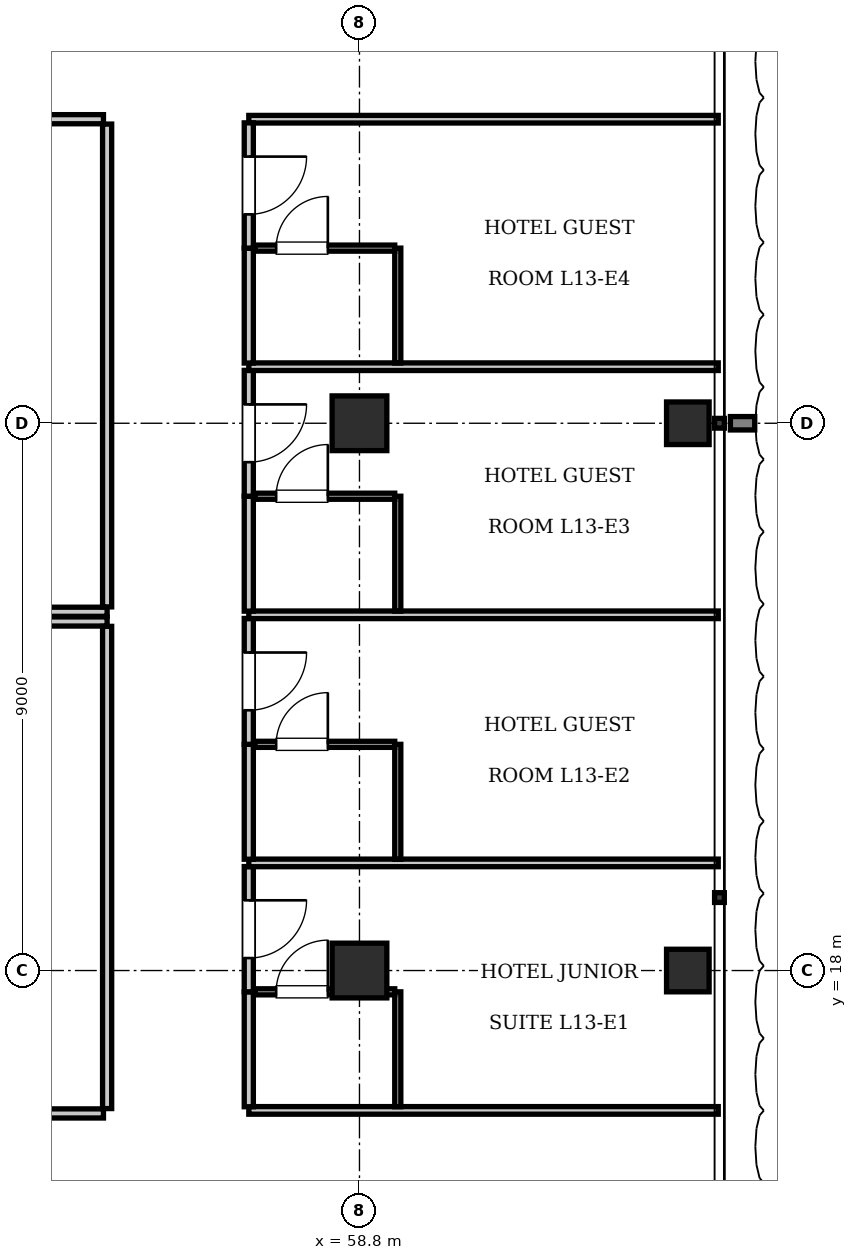
"""IFC4 building model, lengths in metres.
Left out: names, types, materials, properties, quantities, classifications, styles, units other than length and angle.
Written with IfcOpenShell. Run it as: python <this file> out.ifc"""

import sys

from ifc_helpers import new_model, si_unit, direction, frame, frame_2d, origin, origin_2d, place, context, subcontext, project, spatial, rectangle, i_section, extrude, element, fill, save


model = new_model("IFC4")
c1 = context("Model", 3, precision=1e-05, world=origin(), true_north=direction((0.0, 1.0)))
c2 = subcontext(c1, "Body", "Model", "MODEL_VIEW")
j1 = project(units=[si_unit("LENGTHUNIT", "METRE"), si_unit("PLANEANGLEUNIT", "RADIAN")], contexts=[c1])
p1 = place(None, origin())
s1 = spatial("IfcSite", under=j1, at=p1, CompositionType="ELEMENT")
p2 = place(p1, origin())
s2 = spatial("IfcBuilding", under=s1, at=p2, CompositionType="ELEMENT")
p3 = place(p2, frame((0.0, 0.0, 57.75)))
s3 = spatial("IfcBuildingStorey", under=s2, at=p3, CompositionType="ELEMENT", Elevation=57.75)
for number, where, z_axis, x_axis in (
    (1, (58.8, 18.0, 0.0), (0.0, 0.0, 1.0), (1.0, 0.0, 0.0)),
    (2, (58.8, 27.0, 0.0), (0.0, 0.0, 1.0), (1.0, 0.0, 0.0)),
):
    element("IfcColumn", number, at=place(p3, frame(where, z_axis=z_axis, x_axis=x_axis)), inside=s3, PredefinedType="COLUMN", context=c2, shape_type="SweptSolid", body=[
        extrude(rectangle(XDim=0.9, YDim=0.9, at=origin_2d()), origin(), (0.0, 0.0, 1.0), 3.85),
    ])
for number, where, z_axis, x_axis in (
    (3, (64.2, 18.0, 0.0), (0.0, 0.0, 1.0), (1.0, 0.0, 0.0)),
    (4, (64.2, 27.0, 0.0), (0.0, 0.0, 1.0), (1.0, 0.0, 0.0)),
):
    element("IfcColumn", number, at=place(p3, frame(where, z_axis=z_axis, x_axis=x_axis)), inside=s3, PredefinedType="COLUMN", context=c2, shape_type="SweptSolid", body=[
        extrude(i_section(OverallWidth=0.7, OverallDepth=0.7, WebThickness=0.028, FlangeThickness=0.044, at=origin_2d()), origin(), (0.0, 0.0, 1.0), 3.85),
    ])
p4 = place(p3, frame((20.95, 23.9, 0.0), z_axis=(0.0, 0.0, 1.0), x_axis=(1.0, 0.0, 0.0)))
e5 = element("IfcWall", 5, at=p4, inside=s3, PredefinedType="PARTITIONING", context=c2, shape_type="SweptSolid", body=[
    extrude(rectangle(XDim=33.7, YDim=0.15, at=frame_2d((16.85, 0.0))), origin(), (0.0, 0.0, 1.0), 3.61),
])
p5 = place(p3, frame((54.65, 23.98, 0.0), z_axis=(0.0, 0.0, 1.0), x_axis=(0.0, 1.0, 0.0)))
e6 = element("IfcWall", 6, at=p5, inside=s3, PredefinedType="PARTITIONING", context=c2, shape_type="SweptSolid", body=[
    extrude(rectangle(XDim=7.94, YDim=0.15, at=frame_2d((3.97, 0.0))), origin(), (0.0, 0.0, 1.0), 3.255),
])
p6 = place(p3, frame((43.222, 32.0, 0.0), z_axis=(0.0, 0.0, 1.0), x_axis=(1.0, 0.0, 0.0)))
e7 = element("IfcWall", 7, at=p6, inside=s3, PredefinedType="PARTITIONING", context=c2, shape_type="SweptSolid", body=[
    extrude(rectangle(XDim=11.368, YDim=0.15, at=frame_2d((5.684, 0.0))), origin(), (0.0, 0.0, 1.0), 3.61),
])
p7 = place(p6, frame((5.234, 0.0, 0.0)))
e8 = element("IfcOpeningElement", 8, at=p7, cuts=e7, PredefinedType="OPENING", context=c2, shape_type="SweptSolid", body=[
    extrude(rectangle(XDim=0.9, YDim=2.1, at=frame_2d((0.45, 1.05))), frame((0.0, 0.085, 0.0), z_axis=(0.0, -1.0, 0.0), x_axis=(1.0, 0.0, 0.0)), (0.0, 0.0, 1.0), 0.17),
])
p8 = place(p3, frame((20.95, 23.74, 0.0), z_axis=(0.0, 0.0, 1.0), x_axis=(1.0, 0.0, 0.0)))
e9 = element("IfcWall", 9, at=p8, inside=s3, PredefinedType="PARTITIONING", context=c2, shape_type="SweptSolid", body=[
    extrude(rectangle(XDim=33.7, YDim=0.15, at=frame_2d((16.85, 0.0))), origin(), (0.0, 0.0, 1.0), 3.61),
])
p9 = place(p3, frame((54.65, 15.73, 0.0), z_axis=(0.0, 0.0, 1.0), x_axis=(0.0, 1.0, 0.0)))
e10 = element("IfcWall", 10, at=p9, inside=s3, PredefinedType="PARTITIONING", context=c2, shape_type="SweptSolid", body=[
    extrude(rectangle(XDim=7.93, YDim=0.15, at=frame_2d((3.965, 0.0))), origin(), (0.0, 0.0, 1.0), 3.255),
])
p10 = place(p3, frame((40.189, 15.65, 0.0), z_axis=(0.0, 0.0, 1.0), x_axis=(1.0, 0.0, 0.0)))
e11 = element("IfcWall", 11, at=p10, inside=s3, PredefinedType="PARTITIONING", context=c2, shape_type="SweptSolid", body=[
    extrude(rectangle(XDim=14.401, YDim=0.15, at=frame_2d((7.201, 0.0))), origin(), (0.0, 0.0, 1.0), 3.61),
])
p11 = place(p10, frame((6.75, 0.0, 0.0)))
e12 = element("IfcOpeningElement", 12, at=p11, cuts=e11, PredefinedType="OPENING", context=c2, shape_type="SweptSolid", body=[
    extrude(rectangle(XDim=0.9, YDim=2.1, at=frame_2d((0.45, 1.05))), frame((0.0, 0.085, 0.0), z_axis=(0.0, -1.0, 0.0), x_axis=(1.0, 0.0, 0.0)), (0.0, 0.0, 1.0), 0.17),
])
for number, where, z_axis, x_axis in (
    (13, (56.98, 15.7, 0.0), (0.0, 0.0, 1.0), (1.0, 0.0, 0.0)),
    (14, (56.98, 32.0, 0.0), (0.0, 0.0, 1.0), (1.0, 0.0, 0.0)),
):
    element("IfcWall", number, at=place(p3, frame(where, z_axis=z_axis, x_axis=x_axis)), inside=s3, PredefinedType="PARTITIONING", context=c2, shape_type="SweptSolid", body=[
        extrude(rectangle(XDim=7.72, YDim=0.125, at=frame_2d((3.86, 0.0))), origin(), (0.0, 0.0, 1.0), 3.61),
    ])
p12 = place(p3, frame((56.98, 15.76, 0.0), z_axis=(0.0, 0.0, 1.0), x_axis=(0.0, 1.0, 0.0)))
e15 = element("IfcWall", 15, at=p12, inside=s3, PredefinedType="PARTITIONING", context=c2, shape_type="SweptSolid", body=[
    extrude(rectangle(XDim=1.89, YDim=0.15, at=frame_2d((0.945, 0.0))), origin(), (0.0, 0.0, 1.0), 3.61),
])
p13 = place(p3, frame((56.98, 17.65, 0.0), z_axis=(0.0, 0.0, 1.0), x_axis=(0.0, 1.0, 0.0)))
e16 = element("IfcWall", 16, at=p13, inside=s3, PredefinedType="PARTITIONING", context=c2, shape_type="SweptSolid", body=[
    extrude(rectangle(XDim=2.06, YDim=0.15, at=frame_2d((1.03, 0.0))), origin(), (0.0, 0.0, 1.0), 3.61),
])
p14 = place(p13, frame((0.555, 0.0, 0.0)))
e17 = element("IfcOpeningElement", 17, at=p14, cuts=e16, PredefinedType="OPENING", context=c2, shape_type="SweptSolid", body=[
    extrude(rectangle(XDim=0.95, YDim=2.15, at=frame_2d((0.475, 1.075))), frame((0.0, 0.085, 0.0), z_axis=(0.0, -1.0, 0.0), x_axis=(1.0, 0.0, 0.0)), (0.0, 0.0, 1.0), 0.17),
])
p15 = place(p3, frame((59.43, 15.76, 0.0), z_axis=(0.0, 0.0, 1.0), x_axis=(0.0, 1.0, 0.0)))
e18 = element("IfcWall", 18, at=p15, inside=s3, PredefinedType="PARTITIONING", context=c2, shape_type="SweptSolid", body=[
    extrude(rectangle(XDim=1.89, YDim=0.1, at=frame_2d((0.945, 0.0))), origin(), (0.0, 0.0, 1.0), 3.61),
])
p16 = place(p3, frame((57.08, 17.65, 0.0), z_axis=(0.0, 0.0, 1.0), x_axis=(1.0, 0.0, 0.0)))
e19 = element("IfcWall", 19, at=p16, inside=s3, PredefinedType="PARTITIONING", context=c2, shape_type="SweptSolid", body=[
    extrude(rectangle(XDim=2.3, YDim=0.1, at=frame_2d((1.15, 0.0))), origin(), (0.0, 0.0, 1.0), 3.61),
])
p17 = place(p16, frame((0.35, 0.0, 0.0)))
e20 = element("IfcOpeningElement", 20, at=p17, cuts=e19, PredefinedType="OPENING", context=c2, shape_type="SweptSolid", body=[
    extrude(rectangle(XDim=0.85, YDim=2.1, at=frame_2d((0.425, 1.05))), frame((0.0, 0.06, 0.0), z_axis=(0.0, -1.0, 0.0), x_axis=(1.0, 0.0, 0.0)), (0.0, 0.0, 1.0), 0.12),
])
p18 = place(p3, frame((56.98, 19.77, 0.0), z_axis=(0.0, 0.0, 1.0), x_axis=(1.0, 0.0, 0.0)))
e21 = element("IfcWall", 21, at=p18, inside=s3, PredefinedType="PARTITIONING", context=c2, shape_type="SweptSolid", body=[
    extrude(rectangle(XDim=7.72, YDim=0.125, at=frame_2d((3.86, 0.0))), origin(), (0.0, 0.0, 1.0), 3.61),
])
p19 = place(p3, frame((56.98, 19.83, 0.0), z_axis=(0.0, 0.0, 1.0), x_axis=(0.0, 1.0, 0.0)))
e22 = element("IfcWall", 22, at=p19, inside=s3, PredefinedType="PARTITIONING", context=c2, shape_type="SweptSolid", body=[
    extrude(rectangle(XDim=1.89, YDim=0.15, at=frame_2d((0.945, 0.0))), origin(), (0.0, 0.0, 1.0), 3.61),
])
p20 = place(p3, frame((56.98, 21.72, 0.0), z_axis=(0.0, 0.0, 1.0), x_axis=(0.0, 1.0, 0.0)))
e23 = element("IfcWall", 23, at=p20, inside=s3, PredefinedType="PARTITIONING", context=c2, shape_type="SweptSolid", body=[
    extrude(rectangle(XDim=2.07, YDim=0.15, at=frame_2d((1.035, 0.0))), origin(), (0.0, 0.0, 1.0), 3.61),
])
p21 = place(p20, frame((0.56, 0.0, 0.0)))
e24 = element("IfcOpeningElement", 24, at=p21, cuts=e23, PredefinedType="OPENING", context=c2, shape_type="SweptSolid", body=[
    extrude(rectangle(XDim=0.95, YDim=2.15, at=frame_2d((0.475, 1.075))), frame((0.0, 0.085, 0.0), z_axis=(0.0, -1.0, 0.0), x_axis=(1.0, 0.0, 0.0)), (0.0, 0.0, 1.0), 0.17),
])
p22 = place(p3, frame((59.43, 19.83, 0.0), z_axis=(0.0, 0.0, 1.0), x_axis=(0.0, 1.0, 0.0)))
e25 = element("IfcWall", 25, at=p22, inside=s3, PredefinedType="PARTITIONING", context=c2, shape_type="SweptSolid", body=[
    extrude(rectangle(XDim=1.89, YDim=0.1, at=frame_2d((0.945, 0.0))), origin(), (0.0, 0.0, 1.0), 3.61),
])
p23 = place(p3, frame((57.08, 21.72, 0.0), z_axis=(0.0, 0.0, 1.0), x_axis=(1.0, 0.0, 0.0)))
e26 = element("IfcWall", 26, at=p23, inside=s3, PredefinedType="PARTITIONING", context=c2, shape_type="SweptSolid", body=[
    extrude(rectangle(XDim=2.3, YDim=0.1, at=frame_2d((1.15, 0.0))), origin(), (0.0, 0.0, 1.0), 3.61),
])
p24 = place(p23, frame((0.35, 0.0, 0.0)))
e27 = element("IfcOpeningElement", 27, at=p24, cuts=e26, PredefinedType="OPENING", context=c2, shape_type="SweptSolid", body=[
    extrude(rectangle(XDim=0.85, YDim=2.1, at=frame_2d((0.425, 1.05))), frame((0.0, 0.06, 0.0), z_axis=(0.0, -1.0, 0.0), x_axis=(1.0, 0.0, 0.0)), (0.0, 0.0, 1.0), 0.12),
])
p25 = place(p3, frame((56.98, 23.85, 0.0), z_axis=(0.0, 0.0, 1.0), x_axis=(1.0, 0.0, 0.0)))
e28 = element("IfcWall", 28, at=p25, inside=s3, PredefinedType="PARTITIONING", context=c2, shape_type="SweptSolid", body=[
    extrude(rectangle(XDim=7.72, YDim=0.125, at=frame_2d((3.86, 0.0))), origin(), (0.0, 0.0, 1.0), 3.61),
])
p26 = place(p3, frame((56.98, 23.91, 0.0), z_axis=(0.0, 0.0, 1.0), x_axis=(0.0, 1.0, 0.0)))
e29 = element("IfcWall", 29, at=p26, inside=s3, PredefinedType="PARTITIONING", context=c2, shape_type="SweptSolid", body=[
    extrude(rectangle(XDim=1.89, YDim=0.15, at=frame_2d((0.945, 0.0))), origin(), (0.0, 0.0, 1.0), 3.61),
])
p27 = place(p3, frame((56.98, 25.8, 0.0), z_axis=(0.0, 0.0, 1.0), x_axis=(0.0, 1.0, 0.0)))
e30 = element("IfcWall", 30, at=p27, inside=s3, PredefinedType="PARTITIONING", context=c2, shape_type="SweptSolid", body=[
    extrude(rectangle(XDim=2.07, YDim=0.15, at=frame_2d((1.035, 0.0))), origin(), (0.0, 0.0, 1.0), 3.61),
])
p28 = place(p27, frame((0.56, 0.0, 0.0)))
e31 = element("IfcOpeningElement", 31, at=p28, cuts=e30, PredefinedType="OPENING", context=c2, shape_type="SweptSolid", body=[
    extrude(rectangle(XDim=0.95, YDim=2.15, at=frame_2d((0.475, 1.075))), frame((0.0, 0.085, 0.0), z_axis=(0.0, -1.0, 0.0), x_axis=(1.0, 0.0, 0.0)), (0.0, 0.0, 1.0), 0.17),
])
p29 = place(p3, frame((59.43, 23.91, 0.0), z_axis=(0.0, 0.0, 1.0), x_axis=(0.0, 1.0, 0.0)))
e32 = element("IfcWall", 32, at=p29, inside=s3, PredefinedType="PARTITIONING", context=c2, shape_type="SweptSolid", body=[
    extrude(rectangle(XDim=1.89, YDim=0.1, at=frame_2d((0.945, 0.0))), origin(), (0.0, 0.0, 1.0), 3.61),
])
p30 = place(p3, frame((57.08, 25.8, 0.0), z_axis=(0.0, 0.0, 1.0), x_axis=(1.0, 0.0, 0.0)))
e33 = element("IfcWall", 33, at=p30, inside=s3, PredefinedType="PARTITIONING", context=c2, shape_type="SweptSolid", body=[
    extrude(rectangle(XDim=2.3, YDim=0.1, at=frame_2d((1.15, 0.0))), origin(), (0.0, 0.0, 1.0), 3.61),
])
p31 = place(p30, frame((0.35, 0.0, 0.0)))
e34 = element("IfcOpeningElement", 34, at=p31, cuts=e33, PredefinedType="OPENING", context=c2, shape_type="SweptSolid", body=[
    extrude(rectangle(XDim=0.85, YDim=2.1, at=frame_2d((0.425, 1.05))), frame((0.0, 0.06, 0.0), z_axis=(0.0, -1.0, 0.0), x_axis=(1.0, 0.0, 0.0)), (0.0, 0.0, 1.0), 0.12),
])
p32 = place(p3, frame((56.98, 27.93, 0.0), z_axis=(0.0, 0.0, 1.0), x_axis=(1.0, 0.0, 0.0)))
e35 = element("IfcWall", 35, at=p32, inside=s3, PredefinedType="PARTITIONING", context=c2, shape_type="SweptSolid", body=[
    extrude(rectangle(XDim=7.72, YDim=0.125, at=frame_2d((3.86, 0.0))), origin(), (0.0, 0.0, 1.0), 3.61),
])
p33 = place(p3, frame((56.98, 27.99, 0.0), z_axis=(0.0, 0.0, 1.0), x_axis=(0.0, 1.0, 0.0)))
e36 = element("IfcWall", 36, at=p33, inside=s3, PredefinedType="PARTITIONING", context=c2, shape_type="SweptSolid", body=[
    extrude(rectangle(XDim=1.89, YDim=0.15, at=frame_2d((0.945, 0.0))), origin(), (0.0, 0.0, 1.0), 3.61),
])
p34 = place(p3, frame((56.98, 29.88, 0.0), z_axis=(0.0, 0.0, 1.0), x_axis=(0.0, 1.0, 0.0)))
e37 = element("IfcWall", 37, at=p34, inside=s3, PredefinedType="PARTITIONING", context=c2, shape_type="SweptSolid", body=[
    extrude(rectangle(XDim=2.06, YDim=0.15, at=frame_2d((1.03, 0.0))), origin(), (0.0, 0.0, 1.0), 3.61),
])
p35 = place(p34, frame((0.555, 0.0, 0.0)))
e38 = element("IfcOpeningElement", 38, at=p35, cuts=e37, PredefinedType="OPENING", context=c2, shape_type="SweptSolid", body=[
    extrude(rectangle(XDim=0.95, YDim=2.15, at=frame_2d((0.475, 1.075))), frame((0.0, 0.085, 0.0), z_axis=(0.0, -1.0, 0.0), x_axis=(1.0, 0.0, 0.0)), (0.0, 0.0, 1.0), 0.17),
])
p36 = place(p3, frame((59.43, 27.99, 0.0), z_axis=(0.0, 0.0, 1.0), x_axis=(0.0, 1.0, 0.0)))
e39 = element("IfcWall", 39, at=p36, inside=s3, PredefinedType="PARTITIONING", context=c2, shape_type="SweptSolid", body=[
    extrude(rectangle(XDim=1.89, YDim=0.1, at=frame_2d((0.945, 0.0))), origin(), (0.0, 0.0, 1.0), 3.61),
])
p37 = place(p3, frame((57.08, 29.88, 0.0), z_axis=(0.0, 0.0, 1.0), x_axis=(1.0, 0.0, 0.0)))
e40 = element("IfcWall", 40, at=p37, inside=s3, PredefinedType="PARTITIONING", context=c2, shape_type="SweptSolid", body=[
    extrude(rectangle(XDim=2.3, YDim=0.1, at=frame_2d((1.15, 0.0))), origin(), (0.0, 0.0, 1.0), 3.61),
])
p38 = place(p37, frame((0.35, 0.0, 0.0)))
e41 = element("IfcOpeningElement", 41, at=p38, cuts=e40, PredefinedType="OPENING", context=c2, shape_type="SweptSolid", body=[
    extrude(rectangle(XDim=0.85, YDim=2.1, at=frame_2d((0.425, 1.05))), frame((0.0, 0.06, 0.0), z_axis=(0.0, -1.0, 0.0), x_axis=(1.0, 0.0, 0.0)), (0.0, 0.0, 1.0), 0.12),
])
p39 = place(p17, origin())
e42 = element("IfcDoor", 42, at=p39, inside=s3, OperationType="SINGLE_SWING_RIGHT", PredefinedType="DOOR", context=c2, shape_type="SweptSolid", body=[
    extrude(rectangle(XDim=0.85, YDim=2.1, at=frame_2d((0.425, 1.05))), frame((0.0, 0.025, 0.0), z_axis=(0.0, -1.0, 0.0), x_axis=(1.0, 0.0, 0.0)), (0.0, 0.0, 1.0), 0.05),
])
fill(e20, e42)
p40 = place(p14, frame((0.95, 0.0, 0.0), z_axis=(0.0, 0.0, 1.0), x_axis=(-1.0, 0.0, 0.0)))
e43 = element("IfcDoor", 43, at=p40, inside=s3, OperationType="SINGLE_SWING_LEFT", PredefinedType="DOOR", context=c2, shape_type="SweptSolid", body=[
    extrude(rectangle(XDim=0.95, YDim=2.15, at=frame_2d((0.475, 1.075))), frame((0.0, 0.025, 0.0), z_axis=(0.0, -1.0, 0.0), x_axis=(1.0, 0.0, 0.0)), (0.0, 0.0, 1.0), 0.05),
])
fill(e17, e43)
p41 = place(p24, origin())
e44 = element("IfcDoor", 44, at=p41, inside=s3, OperationType="SINGLE_SWING_RIGHT", PredefinedType="DOOR", context=c2, shape_type="SweptSolid", body=[
    extrude(rectangle(XDim=0.85, YDim=2.1, at=frame_2d((0.425, 1.05))), frame((0.0, 0.025, 0.0), z_axis=(0.0, -1.0, 0.0), x_axis=(1.0, 0.0, 0.0)), (0.0, 0.0, 1.0), 0.05),
])
fill(e27, e44)
p42 = place(p21, frame((0.95, 0.0, 0.0), z_axis=(0.0, 0.0, 1.0), x_axis=(-1.0, 0.0, 0.0)))
e45 = element("IfcDoor", 45, at=p42, inside=s3, OperationType="SINGLE_SWING_LEFT", PredefinedType="DOOR", context=c2, shape_type="SweptSolid", body=[
    extrude(rectangle(XDim=0.95, YDim=2.15, at=frame_2d((0.475, 1.075))), frame((0.0, 0.025, 0.0), z_axis=(0.0, -1.0, 0.0), x_axis=(1.0, 0.0, 0.0)), (0.0, 0.0, 1.0), 0.05),
])
fill(e24, e45)
p43 = place(p31, origin())
e46 = element("IfcDoor", 46, at=p43, inside=s3, OperationType="SINGLE_SWING_RIGHT", PredefinedType="DOOR", context=c2, shape_type="SweptSolid", body=[
    extrude(rectangle(XDim=0.85, YDim=2.1, at=frame_2d((0.425, 1.05))), frame((0.0, 0.025, 0.0), z_axis=(0.0, -1.0, 0.0), x_axis=(1.0, 0.0, 0.0)), (0.0, 0.0, 1.0), 0.05),
])
fill(e34, e46)
p44 = place(p28, frame((0.95, 0.0, 0.0), z_axis=(0.0, 0.0, 1.0), x_axis=(-1.0, 0.0, 0.0)))
e47 = element("IfcDoor", 47, at=p44, inside=s3, OperationType="SINGLE_SWING_LEFT", PredefinedType="DOOR", context=c2, shape_type="SweptSolid", body=[
    extrude(rectangle(XDim=0.95, YDim=2.15, at=frame_2d((0.475, 1.075))), frame((0.0, 0.025, 0.0), z_axis=(0.0, -1.0, 0.0), x_axis=(1.0, 0.0, 0.0)), (0.0, 0.0, 1.0), 0.05),
])
fill(e31, e47)
p45 = place(p38, origin())
e48 = element("IfcDoor", 48, at=p45, inside=s3, OperationType="SINGLE_SWING_RIGHT", PredefinedType="DOOR", context=c2, shape_type="SweptSolid", body=[
    extrude(rectangle(XDim=0.85, YDim=2.1, at=frame_2d((0.425, 1.05))), frame((0.0, 0.025, 0.0), z_axis=(0.0, -1.0, 0.0), x_axis=(1.0, 0.0, 0.0)), (0.0, 0.0, 1.0), 0.05),
])
fill(e41, e48)
p46 = place(p35, frame((0.95, 0.0, 0.0), z_axis=(0.0, 0.0, 1.0), x_axis=(-1.0, 0.0, 0.0)))
e49 = element("IfcDoor", 49, at=p46, inside=s3, OperationType="SINGLE_SWING_LEFT", PredefinedType="DOOR", context=c2, shape_type="SweptSolid", body=[
    extrude(rectangle(XDim=0.95, YDim=2.15, at=frame_2d((0.475, 1.075))), frame((0.0, 0.025, 0.0), z_axis=(0.0, -1.0, 0.0), x_axis=(1.0, 0.0, 0.0)), (0.0, 0.0, 1.0), 0.05),
])
fill(e38, e49)
save(model, sys.argv[1])
